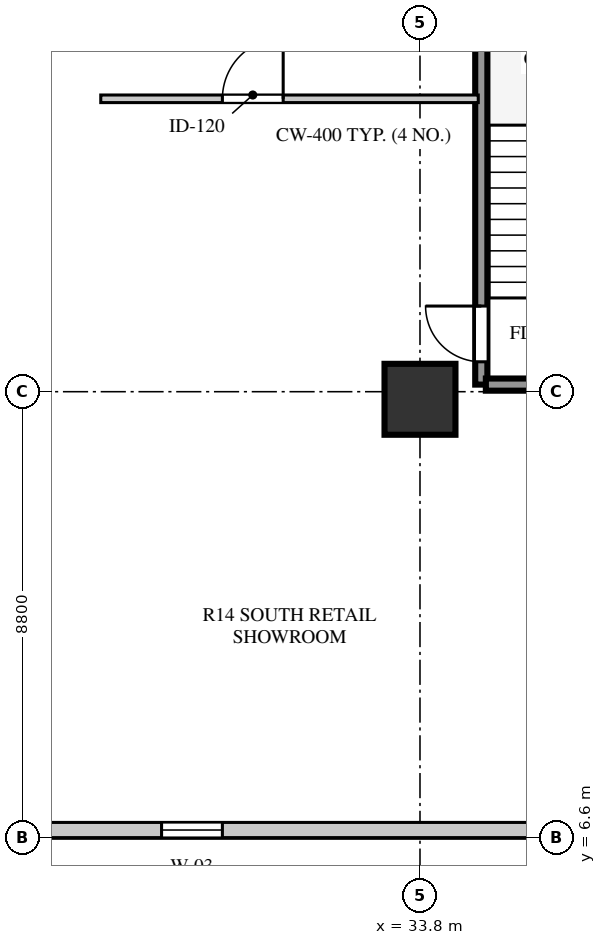
"""IFC4 building model, lengths in metres.
Left out: names, types, materials, properties, quantities, classifications, styles, units other than length and angle.
Written with IfcOpenShell. Run it as: python <this file> out.ifc"""

import sys

from ifc_helpers import new_model, si_unit, direction, frame, frame_2d, origin, origin_2d, place, context, subcontext, project, spatial, rectangle, extrude, element, fill, save


model = new_model("IFC4")
c1 = context("Model", 3, precision=1e-05, world=origin(), true_north=direction((0.0, 1.0)))
c2 = subcontext(c1, "Body", "Model", "MODEL_VIEW")
j1 = project(units=[si_unit("LENGTHUNIT", "METRE"), si_unit("PLANEANGLEUNIT", "RADIAN")], contexts=[c1])
p1 = place(None, origin())
s1 = spatial("IfcSite", under=j1, at=p1, CompositionType="ELEMENT")
p2 = place(p1, origin())
s2 = spatial("IfcBuilding", under=s1, at=p2, CompositionType="ELEMENT")
p3 = place(p2, frame((0.0, 0.0, 12.5)))
s3 = spatial("IfcBuildingStorey", under=s2, at=p3, CompositionType="ELEMENT", Elevation=12.5)
p4 = place(p3, frame((33.8, 15.25, 0.0), z_axis=(0.0, 0.0, 1.0), x_axis=(1.0, 0.0, 0.0)))
e1 = element("IfcColumn", 1, at=p4, inside=s3, PredefinedType="COLUMN", context=c2, shape_type="SweptSolid", body=[
    extrude(rectangle(XDim=1.4, YDim=1.4, at=origin_2d()), origin(), (0.0, 0.0, 1.0), 4.22),
])
p5 = place(p3, frame((12.3, 6.75, 0.0), z_axis=(0.0, 0.0, 1.0), x_axis=(1.0, 0.0, 0.0)))
e2 = element("IfcWall", 2, at=p5, inside=s3, PredefinedType="STANDARD", context=c2, shape_type="SweptSolid", body=[
    extrude(rectangle(XDim=34.0, YDim=0.3, at=frame_2d((17.0, 0.0))), origin(), (0.0, 0.0, 1.0), 4.22),
])
p6 = place(p5, frame((16.4, 0.0, 0.8)))
e3 = element("IfcOpeningElement", 3, at=p6, cuts=e2, PredefinedType="OPENING", context=c2, shape_type="SweptSolid", body=[
    extrude(rectangle(XDim=1.2, YDim=1.75, at=frame_2d((0.6, 0.875))), frame((0.0, 0.16, 0.0), z_axis=(0.0, -1.0, 0.0), x_axis=(1.0, 0.0, 0.0)), (0.0, 0.0, 1.0), 0.32),
])
p7 = place(p3, frame((35.01, 15.54, 0.0), z_axis=(0.0, 0.0, 1.0), x_axis=(0.0, 1.0, 0.0)))
e4 = element("IfcWall", 4, at=p7, inside=s3, PredefinedType="SHEAR", context=c2, shape_type="SweptSolid", body=[
    extrude(rectangle(XDim=8.12, YDim=0.24, at=frame_2d((4.06, 0.0))), origin(), (0.0, 0.0, 1.0), 4.5),
])
p8 = place(p7, frame((0.45, 0.0, 0.0)))
e5 = element("IfcOpeningElement", 5, at=p8, cuts=e4, PredefinedType="OPENING", context=c2, shape_type="SweptSolid", body=[
    extrude(rectangle(XDim=1.1, YDim=2.1, at=frame_2d((0.55, 1.05))), frame((0.0, 0.13, 0.0), z_axis=(0.0, -1.0, 0.0), x_axis=(1.0, 0.0, 0.0)), (0.0, 0.0, 1.0), 0.26),
])
p9 = place(p3, frame((35.1, 15.54, 0.0), z_axis=(0.0, 0.0, 1.0), x_axis=(1.0, 0.0, 0.0)))
e6 = element("IfcWall", 6, at=p9, inside=s3, PredefinedType="SHEAR", context=c2, shape_type="SweptSolid", body=[
    extrude(rectangle(XDim=3.5, YDim=0.24, at=frame_2d((1.75, 0.0))), origin(), (0.0, 0.0, 1.0), 4.5),
])
p10 = place(p3, frame((27.5, 21.18, 0.0), z_axis=(0.0, 0.0, 1.0), x_axis=(1.0, 0.0, 0.0)))
e7 = element("IfcWall", 7, at=p10, inside=s3, PredefinedType="PARTITIONING", context=c2, shape_type="SweptSolid", body=[
    extrude(rectangle(XDim=7.45, YDim=0.15, at=frame_2d((3.725, 0.0))), origin(), (0.0, 0.0, 1.0), 3.82),
])
p11 = place(p10, frame((2.4, 0.0, 0.0)))
e8 = element("IfcOpeningElement", 8, at=p11, cuts=e7, PredefinedType="OPENING", context=c2, shape_type="SweptSolid", body=[
    extrude(rectangle(XDim=1.2, YDim=2.1, at=frame_2d((0.6, 1.05))), frame((0.0, 0.085, 0.0), z_axis=(0.0, -1.0, 0.0), x_axis=(1.0, 0.0, 0.0)), (0.0, 0.0, 1.0), 0.17),
])
p12 = place(p6, origin())
e9 = element("IfcWindow", 9, at=p12, inside=s3, PartitioningType="SINGLE_PANEL", PredefinedType="WINDOW", context=c2, shape_type="SweptSolid", body=[
    extrude(rectangle(XDim=1.2, YDim=1.75, at=frame_2d((0.6, 0.875))), frame((0.0, 0.03, 0.0), z_axis=(0.0, -1.0, 0.0), x_axis=(1.0, 0.0, 0.0)), (0.0, 0.0, 1.0), 0.06),
])
fill(e3, e9)
p13 = place(p8, origin())
e10 = element("IfcDoor", 10, at=p13, inside=s3, OperationType="SINGLE_SWING_RIGHT", PredefinedType="DOOR", context=c2, shape_type="SweptSolid", body=[
    extrude(rectangle(XDim=1.1, YDim=2.1, at=frame_2d((0.55, 1.05))), frame((0.0, 0.025, 0.0), z_axis=(0.0, -1.0, 0.0), x_axis=(1.0, 0.0, 0.0)), (0.0, 0.0, 1.0), 0.05),
])
fill(e5, e10)
p14 = place(p11, frame((1.2, 0.0, 0.0), z_axis=(0.0, 0.0, 1.0), x_axis=(-1.0, 0.0, 0.0)))
e11 = element("IfcDoor", 11, at=p14, inside=s3, OperationType="SINGLE_SWING_LEFT", PredefinedType="DOOR", context=c2, shape_type="SweptSolid", body=[
    extrude(rectangle(XDim=1.2, YDim=2.1, at=frame_2d((0.6, 1.05))), frame((0.0, 0.025, 0.0), z_axis=(0.0, -1.0, 0.0), x_axis=(1.0, 0.0, 0.0)), (0.0, 0.0, 1.0), 0.05),
])
fill(e8, e11)
save(model, sys.argv[1])
